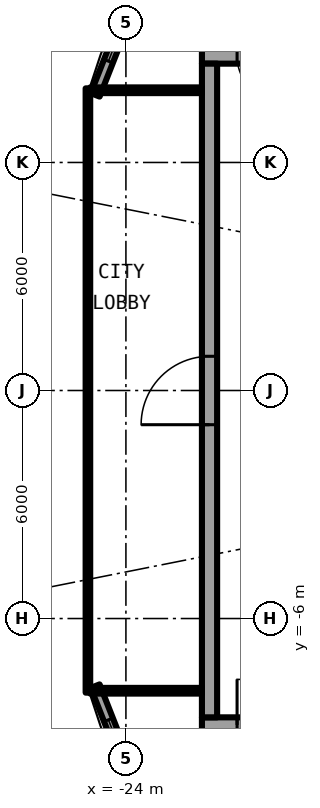
"""IFC4 building model, lengths in metres.
Left out: names, types, materials, properties, quantities, classifications, styles, units other than length and angle.
Written with IfcOpenShell. Run it as: python <this file> out.ifc"""

import sys

from ifc_helpers import new_model, si_unit, direction, frame, frame_2d, origin, place, context, subcontext, project, spatial, rectangle, extrude, element, fill, save


model = new_model("IFC4")
c1 = context("Model", 3, precision=1e-05, world=origin(), true_north=direction((0.0, 1.0)))
c2 = subcontext(c1, "Body", "Model", "MODEL_VIEW")
j1 = project(units=[si_unit("LENGTHUNIT", "METRE"), si_unit("PLANEANGLEUNIT", "RADIAN")], contexts=[c1])
p1 = place(None, origin())
s1 = spatial("IfcSite", under=j1, at=p1, CompositionType="ELEMENT")
p2 = place(p1, origin())
s2 = spatial("IfcBuilding", under=s1, at=p2, CompositionType="ELEMENT")
p3 = place(p2, frame((0.0, 0.0, 237.1)))
s3 = spatial("IfcBuildingStorey", under=s2, at=p3, CompositionType="ELEMENT", Elevation=237.1)
p4 = place(p3, frame((-24.809, -7.779, 0.0), z_axis=(0.0, 0.0, 1.0), x_axis=(0.366351636034, -0.930476479432, 0.0)))
e1 = element("IfcWall", 1, at=p4, inside=s3, PredefinedType="SOLIDWALL", context=c2, shape_type="SweptSolid", body=[
    extrude(rectangle(XDim=3.705, YDim=0.25, at=frame_2d((1.852, 0.0))), origin(), (0.0, 0.0, 1.0), 2.7),
])
p5 = place(p4, frame((0.952, 0.0, 0.3)))
e2 = element("IfcOpeningElement", 2, at=p5, cuts=e1, PredefinedType="OPENING", context=c2, shape_type="SweptSolid", body=[
    extrude(rectangle(XDim=1.8, YDim=2.1, at=frame_2d((0.9, 1.05))), frame((0.0, 0.135, 0.0), z_axis=(0.0, -1.0, 0.0), x_axis=(1.0, 0.0, 0.0)), (0.0, 0.0, 1.0), 0.27),
])
p6 = place(p3, frame((-23.452, 11.226, 0.0), z_axis=(0.0, 0.0, 1.0), x_axis=(-0.366351636034, -0.930476479432, 0.0)))
e3 = element("IfcWall", 3, at=p6, inside=s3, PredefinedType="SOLIDWALL", context=c2, shape_type="SweptSolid", body=[
    extrude(rectangle(XDim=3.705, YDim=0.25, at=frame_2d((1.852, 0.0))), origin(), (0.0, 0.0, 1.0), 2.7),
])
p7 = place(p6, frame((0.952, 0.0, 0.3)))
e4 = element("IfcOpeningElement", 4, at=p7, cuts=e3, PredefinedType="OPENING", context=c2, shape_type="SweptSolid", body=[
    extrude(rectangle(XDim=1.8, YDim=2.1, at=frame_2d((0.9, 1.05))), frame((0.0, 0.135, 0.0), z_axis=(0.0, -1.0, 0.0), x_axis=(1.0, 0.0, 0.0)), (0.0, 0.0, 1.0), 0.27),
])
p8 = place(p3, frame((-22.0, -8.8, 0.0), z_axis=(0.0, 0.0, 1.0), x_axis=(1.0, 0.0, 0.0)))
e5 = element("IfcWall", 5, at=p8, inside=s3, PredefinedType="SHEAR", context=c2, shape_type="SweptSolid", body=[
    extrude(rectangle(XDim=13.4, YDim=0.4, at=frame_2d((6.7, 0.0))), origin(), (0.0, 0.0, 1.0), 3.05),
])
p9 = place(p8, frame((0.925, 0.0, 0.0)))
e6 = element("IfcOpeningElement", 6, at=p9, cuts=e5, PredefinedType="OPENING", context=c2, shape_type="SweptSolid", body=[
    extrude(rectangle(XDim=1.2, YDim=2.3, at=frame_2d((0.6, 1.15))), frame((0.0, 0.21, 0.0), z_axis=(0.0, -1.0, 0.0), x_axis=(1.0, 0.0, 0.0)), (0.0, 0.0, 1.0), 0.42),
])
p10 = place(p3, frame((-8.6, 8.8, 0.0), z_axis=(0.0, 0.0, 1.0), x_axis=(-1.0, 0.0, 0.0)))
e7 = element("IfcWall", 7, at=p10, inside=s3, PredefinedType="SHEAR", context=c2, shape_type="SweptSolid", body=[
    extrude(rectangle(XDim=13.4, YDim=0.4, at=frame_2d((6.7, 0.0))), origin(), (0.0, 0.0, 1.0), 3.05),
])
p11 = place(p10, frame((11.275, 0.0, 0.0)))
e8 = element("IfcOpeningElement", 8, at=p11, cuts=e7, PredefinedType="OPENING", context=c2, shape_type="SweptSolid", body=[
    extrude(rectangle(XDim=1.2, YDim=2.3, at=frame_2d((0.6, 1.15))), frame((0.0, 0.21, 0.0), z_axis=(0.0, -1.0, 0.0), x_axis=(1.0, 0.0, 0.0)), (0.0, 0.0, 1.0), 0.42),
])
p12 = place(p3, frame((-21.8, -8.6, 0.0), z_axis=(0.0, 0.0, 1.0), x_axis=(0.0, 1.0, 0.0)))
e9 = element("IfcWall", 9, at=p12, inside=s3, PredefinedType="SHEAR", context=c2, shape_type="SweptSolid", body=[
    extrude(rectangle(XDim=17.2, YDim=0.4, at=frame_2d((8.6, 0.0))), origin(), (0.0, 0.0, 1.0), 3.05),
])
p13 = place(p12, frame((7.7, 0.0, 0.0)))
e10 = element("IfcOpeningElement", 10, at=p13, cuts=e9, PredefinedType="OPENING", context=c2, shape_type="SweptSolid", body=[
    extrude(rectangle(XDim=1.8, YDim=2.3, at=frame_2d((0.9, 1.15))), frame((0.0, 0.21, 0.0), z_axis=(0.0, -1.0, 0.0), x_axis=(1.0, 0.0, 0.0)), (0.0, 0.0, 1.0), 0.42),
])
for number, where, z_axis, x_axis in (
    (11, (-22.0, 7.9, 0.0), (0.0, 0.0, 1.0), (-1.0, 0.0, 0.0)),
    (12, (-22.0, -7.9, 0.0), (0.0, 0.0, 1.0), (-1.0, 0.0, 0.0)),
):
    element("IfcWall", number, at=place(p3, frame(where, z_axis=z_axis, x_axis=x_axis)), inside=s3, PredefinedType="PARTITIONING", context=c2, shape_type="SweptSolid", body=[
        extrude(rectangle(XDim=2.94, YDim=0.15, at=frame_2d((1.47, 0.0))), origin(), (0.0, 0.0, 1.0), 2.7),
    ])
p14 = place(p3, frame((-25.0, 7.95, 0.0), z_axis=(0.0, 0.0, 1.0), x_axis=(0.0, -1.0, 0.0)))
e13 = element("IfcWall", 13, at=p14, inside=s3, PredefinedType="PARTITIONING", context=c2, shape_type="SweptSolid", body=[
    extrude(rectangle(XDim=15.9, YDim=0.12, at=frame_2d((7.95, 0.0))), origin(), (0.0, 0.0, 1.0), 2.7),
])
p15 = place(p14, frame((0.95, 0.0, 0.1)))
e14 = element("IfcOpeningElement", 14, at=p15, cuts=e13, PredefinedType="OPENING", context=c2, shape_type="SweptSolid", body=[
    extrude(rectangle(XDim=14.0, YDim=2.35, at=frame_2d((7.0, 1.175))), frame((0.0, 0.07, 0.0), z_axis=(0.0, -1.0, 0.0), x_axis=(1.0, 0.0, 0.0)), (0.0, 0.0, 1.0), 0.14),
])
p16 = place(p5, origin())
e15 = element("IfcWindow", 15, at=p16, inside=s3, PartitioningType="SINGLE_PANEL", PredefinedType="WINDOW", context=c2, shape_type="SweptSolid", body=[
    extrude(rectangle(XDim=1.8, YDim=2.1, at=frame_2d((0.9, 1.05))), frame((0.0, 0.03, 0.0), z_axis=(0.0, -1.0, 0.0), x_axis=(1.0, 0.0, 0.0)), (0.0, 0.0, 1.0), 0.06),
])
fill(e2, e15)
p17 = place(p7, origin())
e16 = element("IfcWindow", 16, at=p17, inside=s3, PartitioningType="SINGLE_PANEL", PredefinedType="WINDOW", context=c2, shape_type="SweptSolid", body=[
    extrude(rectangle(XDim=1.8, YDim=2.1, at=frame_2d((0.9, 1.05))), frame((0.0, 0.03, 0.0), z_axis=(0.0, -1.0, 0.0), x_axis=(1.0, 0.0, 0.0)), (0.0, 0.0, 1.0), 0.06),
])
fill(e4, e16)
p18 = place(p9, origin())
e17 = element("IfcDoor", 17, at=p18, inside=s3, OperationType="SINGLE_SWING_RIGHT", PredefinedType="DOOR", context=c2, shape_type="SweptSolid", body=[
    extrude(rectangle(XDim=1.2, YDim=2.3, at=frame_2d((0.6, 1.15))), frame((0.0, 0.025, 0.0), z_axis=(0.0, -1.0, 0.0), x_axis=(1.0, 0.0, 0.0)), (0.0, 0.0, 1.0), 0.05),
])
fill(e6, e17)
p19 = place(p11, origin())
e18 = element("IfcDoor", 18, at=p19, inside=s3, OperationType="SINGLE_SWING_LEFT", PredefinedType="DOOR", context=c2, shape_type="SweptSolid", body=[
    extrude(rectangle(XDim=1.2, YDim=2.3, at=frame_2d((0.6, 1.15))), frame((0.0, 0.025, 0.0), z_axis=(0.0, -1.0, 0.0), x_axis=(1.0, 0.0, 0.0)), (0.0, 0.0, 1.0), 0.05),
])
fill(e8, e18)
p20 = place(p13, origin())
e19 = element("IfcDoor", 19, at=p20, inside=s3, OperationType="SINGLE_SWING_LEFT", PredefinedType="DOOR", context=c2, shape_type="SweptSolid", body=[
    extrude(rectangle(XDim=1.8, YDim=2.3, at=frame_2d((0.9, 1.15))), frame((0.0, 0.025, 0.0), z_axis=(0.0, -1.0, 0.0), x_axis=(1.0, 0.0, 0.0)), (0.0, 0.0, 1.0), 0.05),
])
fill(e10, e19)
p21 = place(p15, origin())
e20 = element("IfcWindow", 20, at=p21, inside=s3, PartitioningType="SINGLE_PANEL", PredefinedType="WINDOW", context=c2, shape_type="SweptSolid", body=[
    extrude(rectangle(XDim=14.0, YDim=2.35, at=frame_2d((7.0, 1.175))), frame((0.0, 0.03, 0.0), z_axis=(0.0, -1.0, 0.0), x_axis=(1.0, 0.0, 0.0)), (0.0, 0.0, 1.0), 0.06),
])
fill(e14, e20)
save(model, sys.argv[1])
